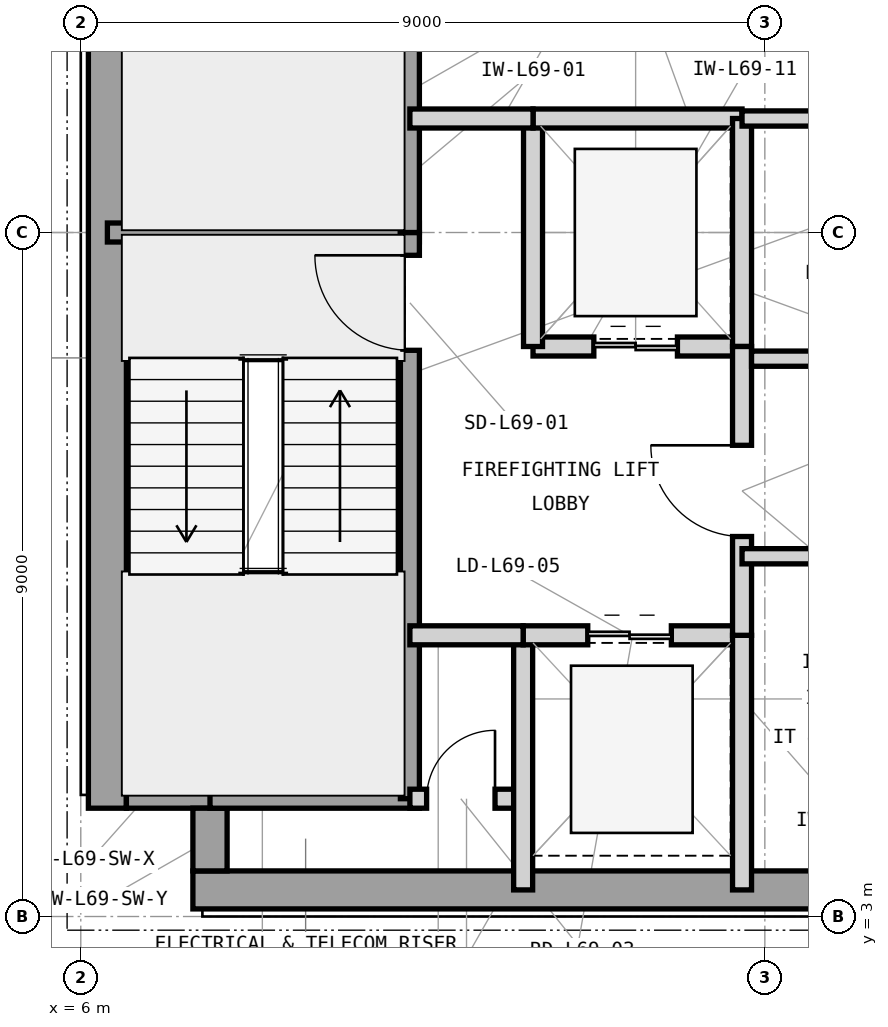
"""IFC4 building model, lengths in metres.
Left out: names, types, materials, properties, quantities, classifications, styles, units other than length and angle.
Written with IfcOpenShell. Run it as: python <this file> out.ifc"""

import sys

from ifc_helpers import new_model, si_unit, direction, frame, frame_2d, origin, place, context, subcontext, project, spatial, rectangle, extrude, element, fill, save


model = new_model("IFC4")
c1 = context("Model", 3, precision=1e-05, world=origin(), true_north=direction((0.0, 1.0)))
c2 = subcontext(c1, "Body", "Model", "MODEL_VIEW")
j1 = project(units=[si_unit("LENGTHUNIT", "METRE"), si_unit("PLANEANGLEUNIT", "RADIAN")], contexts=[c1])
p1 = place(None, origin())
s1 = spatial("IfcSite", under=j1, at=p1, CompositionType="ELEMENT")
p2 = place(p1, origin())
s2 = spatial("IfcBuilding", under=s1, at=p2, CompositionType="ELEMENT")
p3 = place(p2, frame((0.0, 0.0, 282.0)))
s3 = spatial("IfcBuildingStorey", under=s2, at=p3, CompositionType="ELEMENT", Elevation=282.0)
p4 = place(p3, frame((7.475, 3.35, 0.0), z_axis=(0.0, 0.0, 1.0), x_axis=(1.0, 0.0, 0.0)))
e1 = element("IfcWall", 1, at=p4, inside=s3, PredefinedType="SHEAR", context=c2, shape_type="SweptSolid", body=[
    extrude(rectangle(XDim=16.425, YDim=0.5, at=frame_2d((8.212, 0.0))), origin(), (0.0, 0.0, 1.0), 3.9),
])
p5 = place(p3, frame((6.35, 4.425, 0.0), z_axis=(0.0, 0.0, 1.0), x_axis=(0.0, 1.0, 0.0)))
e2 = element("IfcWall", 2, at=p5, inside=s3, PredefinedType="SHEAR", context=c2, shape_type="SweptSolid", body=[
    extrude(rectangle(XDim=15.15, YDim=0.5, at=frame_2d((7.575, 0.0))), origin(), (0.0, 0.0, 1.0), 3.9),
])
p6 = place(p3, frame((6.6, 4.65, 0.0), z_axis=(0.0, 0.0, 1.0), x_axis=(1.0, 0.0, 0.0)))
e3 = element("IfcWall", 3, at=p6, inside=s3, PredefinedType="SHEAR", context=c2, shape_type="SweptSolid", body=[
    extrude(rectangle(XDim=1.325, YDim=0.45, at=frame_2d((0.663, 0.0))), origin(), (0.0, 0.0, 1.0), 3.9),
])
p7 = place(p3, frame((7.7, 3.6, 0.0), z_axis=(0.0, 0.0, 1.0), x_axis=(0.0, 1.0, 0.0)))
e4 = element("IfcWall", 4, at=p7, inside=s3, PredefinedType="SHEAR", context=c2, shape_type="SweptSolid", body=[
    extrude(rectangle(XDim=0.825, YDim=0.45, at=frame_2d((0.413, 0.0))), origin(), (0.0, 0.0, 1.0), 3.9),
])
p8 = place(p3, frame((6.35, 12.0, 0.0), z_axis=(0.0, 0.0, 1.0), x_axis=(1.0, 0.0, 0.0)))
e5 = element("IfcWall", 5, at=p8, inside=s3, PredefinedType="SHEAR", context=c2, shape_type="SweptSolid", body=[
    extrude(rectangle(XDim=4.105, YDim=0.25, at=frame_2d((2.052, 0.0))), origin(), (0.0, 0.0, 1.0), 3.9),
])
p9 = place(p3, frame((7.7, 4.55, 0.0), z_axis=(0.0, 0.0, 1.0), x_axis=(1.0, 0.0, 0.0)))
e6 = element("IfcWall", 6, at=p9, inside=s3, PredefinedType="SHEAR", context=c2, shape_type="SweptSolid", body=[
    extrude(rectangle(XDim=2.755, YDim=0.25, at=frame_2d((1.377, 0.0))), origin(), (0.0, 0.0, 1.0), 3.9),
])
p10 = place(p3, frame((10.33, 4.55, 0.0), z_axis=(0.0, 0.0, 1.0), x_axis=(0.0, 1.0, 0.0)))
e7 = element("IfcWall", 7, at=p10, inside=s3, PredefinedType="SHEAR", context=c2, shape_type="SweptSolid", body=[
    extrude(rectangle(XDim=7.45, YDim=0.25, at=frame_2d((3.725, 0.0))), origin(), (0.0, 0.0, 1.0), 3.9),
])
p11 = place(p10, frame((5.9, 0.0, 0.0)))
e8 = element("IfcOpeningElement", 8, at=p11, cuts=e7, PredefinedType="OPENING", context=c2, shape_type="SweptSolid", body=[
    extrude(rectangle(XDim=1.25, YDim=2.2, at=frame_2d((0.625, 1.1))), frame((0.0, 0.135, 0.0), z_axis=(0.0, -1.0, 0.0), x_axis=(1.0, 0.0, 0.0)), (0.0, 0.0, 1.0), 0.27),
])
p12 = place(p3, frame((10.33, 12.0, 0.0), z_axis=(0.0, 0.0, 1.0), x_axis=(0.0, 1.0, 0.0)))
e9 = element("IfcWall", 9, at=p12, inside=s3, PredefinedType="SHEAR", context=c2, shape_type="SweptSolid", body=[
    extrude(rectangle(XDim=7.45, YDim=0.25, at=frame_2d((3.725, 0.0))), origin(), (0.0, 0.0, 1.0), 3.9),
])
p13 = place(p12, frame((5.85, 0.0, 0.0)))
e10 = element("IfcOpeningElement", 10, at=p13, cuts=e9, PredefinedType="OPENING", context=c2, shape_type="SweptSolid", body=[
    extrude(rectangle(XDim=1.25, YDim=2.2, at=frame_2d((0.625, 1.1))), frame((0.0, 0.135, 0.0), z_axis=(0.0, -1.0, 0.0), x_axis=(1.0, 0.0, 0.0)), (0.0, 0.0, 1.0), 0.27),
])
p14 = place(p3, frame((10.33, 4.55, 0.0), z_axis=(0.0, 0.0, 1.0), x_axis=(1.0, 0.0, 0.0)))
e11 = element("IfcWall", 11, at=p14, inside=s3, PredefinedType="PARTITIONING", context=c2, shape_type="SweptSolid", body=[
    extrude(rectangle(XDim=1.49, YDim=0.25, at=frame_2d((0.745, 0.0))), origin(), (0.0, 0.0, 1.0), 3.63),
])
p15 = place(p14, frame((0.22, 0.0, 0.0)))
e12 = element("IfcOpeningElement", 12, at=p15, cuts=e11, PredefinedType="OPENING", context=c2, shape_type="SweptSolid", body=[
    extrude(rectangle(XDim=0.9, YDim=2.1, at=frame_2d((0.45, 1.05))), frame((0.0, 0.135, 0.0), z_axis=(0.0, -1.0, 0.0), x_axis=(1.0, 0.0, 0.0)), (0.0, 0.0, 1.0), 0.27),
])
p16 = place(p3, frame((11.82, 3.35, 0.0), z_axis=(0.0, 0.0, 1.0), x_axis=(0.0, 1.0, 0.0)))
e13 = element("IfcWall", 13, at=p16, inside=s3, PredefinedType="PARTITIONING", context=c2, shape_type="SweptSolid", body=[
    extrude(rectangle(XDim=3.35, YDim=0.25, at=frame_2d((1.675, 0.0))), origin(), (0.0, 0.0, 1.0), 3.63),
])
p17 = place(p3, frame((11.82, 6.7, 0.0), z_axis=(0.0, 0.0, 1.0), x_axis=(1.0, 0.0, 0.0)))
e14 = element("IfcWall", 14, at=p17, inside=s3, PredefinedType="PARTITIONING", context=c2, shape_type="SweptSolid", body=[
    extrude(rectangle(XDim=2.88, YDim=0.25, at=frame_2d((1.44, 0.0))), origin(), (0.0, 0.0, 1.0), 3.354),
])
p18 = place(p17, frame((0.85, 0.0, 0.0)))
e15 = element("IfcOpeningElement", 15, at=p18, cuts=e14, PredefinedType="OPENING", context=c2, shape_type="SweptSolid", body=[
    extrude(rectangle(XDim=1.1, YDim=2.25, at=frame_2d((0.55, 1.125))), frame((0.0, 0.135, 0.0), z_axis=(0.0, -1.0, 0.0), x_axis=(1.0, 0.0, 0.0)), (0.0, 0.0, 1.0), 0.27),
])
p19 = place(p3, frame((14.7, 3.35, 0.0), z_axis=(0.0, 0.0, 1.0), x_axis=(0.0, 1.0, 0.0)))
e16 = element("IfcWall", 16, at=p19, inside=s3, PredefinedType="PARTITIONING", context=c2, shape_type="SweptSolid", body=[
    extrude(rectangle(XDim=3.35, YDim=0.25, at=frame_2d((1.675, 0.0))), origin(), (0.0, 0.0, 1.0), 3.63),
])
p20 = place(p3, frame((11.95, 10.5, 0.0), z_axis=(0.0, 0.0, 1.0), x_axis=(1.0, 0.0, 0.0)))
e17 = element("IfcWall", 17, at=p20, inside=s3, PredefinedType="PARTITIONING", context=c2, shape_type="SweptSolid", body=[
    extrude(rectangle(XDim=2.75, YDim=0.25, at=frame_2d((1.375, 0.0))), origin(), (0.0, 0.0, 1.0), 3.354),
])
p21 = place(p20, frame((0.8, 0.0, 0.0)))
e18 = element("IfcOpeningElement", 18, at=p21, cuts=e17, PredefinedType="OPENING", context=c2, shape_type="SweptSolid", body=[
    extrude(rectangle(XDim=1.1, YDim=2.25, at=frame_2d((0.55, 1.125))), frame((0.0, 0.135, 0.0), z_axis=(0.0, -1.0, 0.0), x_axis=(1.0, 0.0, 0.0)), (0.0, 0.0, 1.0), 0.27),
])
p22 = place(p3, frame((11.95, 10.5, 0.0), z_axis=(0.0, 0.0, 1.0), x_axis=(0.0, 1.0, 0.0)))
e19 = element("IfcWall", 19, at=p22, inside=s3, PredefinedType="PARTITIONING", context=c2, shape_type="SweptSolid", body=[
    extrude(rectangle(XDim=3.0, YDim=0.25, at=frame_2d((1.5, 0.0))), origin(), (0.0, 0.0, 1.0), 3.63),
])
p23 = place(p3, frame((11.95, 13.5, 0.0), z_axis=(0.0, 0.0, 1.0), x_axis=(1.0, 0.0, 0.0)))
e20 = element("IfcWall", 20, at=p23, inside=s3, PredefinedType="PARTITIONING", context=c2, shape_type="SweptSolid", body=[
    extrude(rectangle(XDim=2.75, YDim=0.25, at=frame_2d((1.375, 0.0))), origin(), (0.0, 0.0, 1.0), 3.354),
])
p24 = place(p3, frame((14.7, 10.5, 0.0), z_axis=(0.0, 0.0, 1.0), x_axis=(0.0, 1.0, 0.0)))
e21 = element("IfcWall", 21, at=p24, inside=s3, PredefinedType="PARTITIONING", context=c2, shape_type="SweptSolid", body=[
    extrude(rectangle(XDim=3.0, YDim=0.25, at=frame_2d((1.5, 0.0))), origin(), (0.0, 0.0, 1.0), 3.63),
])
p25 = place(p3, frame((14.7, 6.7, 0.0), z_axis=(0.0, 0.0, 1.0), x_axis=(0.0, 1.0, 0.0)))
e22 = element("IfcWall", 22, at=p25, inside=s3, PredefinedType="PARTITIONING", context=c2, shape_type="SweptSolid", body=[
    extrude(rectangle(XDim=3.8, YDim=0.25, at=frame_2d((1.9, 0.0))), origin(), (0.0, 0.0, 1.0), 3.63),
])
p26 = place(p25, frame((1.3, 0.0, 0.0)))
e23 = element("IfcOpeningElement", 23, at=p26, cuts=e22, PredefinedType="OPENING", context=c2, shape_type="SweptSolid", body=[
    extrude(rectangle(XDim=1.2, YDim=2.2, at=frame_2d((0.6, 1.1))), frame((0.0, 0.135, 0.0), z_axis=(0.0, -1.0, 0.0), x_axis=(1.0, 0.0, 0.0)), (0.0, 0.0, 1.0), 0.27),
])
p27 = place(p3, frame((10.33, 13.5, 0.0), z_axis=(0.0, 0.0, 1.0), x_axis=(1.0, 0.0, 0.0)))
e24 = element("IfcWall", 24, at=p27, inside=s3, PredefinedType="PARTITIONING", context=c2, shape_type="SweptSolid", body=[
    extrude(rectangle(XDim=1.62, YDim=0.25, at=frame_2d((0.81, 0.0))), origin(), (0.0, 0.0, 1.0), 3.354),
])
p28 = place(p3, frame((10.33, 6.7, 0.0), z_axis=(0.0, 0.0, 1.0), x_axis=(1.0, 0.0, 0.0)))
e25 = element("IfcWall", 25, at=p28, inside=s3, PredefinedType="PARTITIONING", context=c2, shape_type="SweptSolid", body=[
    extrude(rectangle(XDim=1.49, YDim=0.25, at=frame_2d((0.745, 0.0))), origin(), (0.0, 0.0, 1.0), 3.354),
])
p29 = place(p3, frame((14.7, 7.74, 0.0), z_axis=(0.0, 0.0, 1.0), x_axis=(1.0, 0.0, 0.0)))
e26 = element("IfcWall", 26, at=p29, inside=s3, PredefinedType="PARTITIONING", context=c2, shape_type="SweptSolid", body=[
    extrude(rectangle(XDim=2.95, YDim=0.2, at=frame_2d((1.475, 0.0))), origin(), (0.0, 0.0, 1.0), 3.63),
])
p30 = place(p29, frame((1.025, 0.0, 0.0)))
e27 = element("IfcOpeningElement", 27, at=p30, cuts=e26, PredefinedType="OPENING", context=c2, shape_type="SweptSolid", body=[
    extrude(rectangle(XDim=0.9, YDim=2.1, at=frame_2d((0.45, 1.05))), frame((0.0, 0.11, 0.0), z_axis=(0.0, -1.0, 0.0), x_axis=(1.0, 0.0, 0.0)), (0.0, 0.0, 1.0), 0.22),
])
p31 = place(p3, frame((14.825, 10.34, 0.0), z_axis=(0.0, 0.0, 1.0), x_axis=(1.0, 0.0, 0.0)))
e28 = element("IfcWall", 28, at=p31, inside=s3, PredefinedType="PARTITIONING", context=c2, shape_type="SweptSolid", body=[
    extrude(rectangle(XDim=4.88, YDim=0.2, at=frame_2d((2.44, 0.0))), origin(), (0.0, 0.0, 1.0), 3.63),
])
p32 = place(p3, frame((14.7, 13.5, 0.0), z_axis=(0.0, 0.0, 1.0), x_axis=(1.0, 0.0, 0.0)))
e29 = element("IfcWall", 29, at=p32, inside=s3, PredefinedType="PARTITIONING", context=c2, shape_type="SweptSolid", body=[
    extrude(rectangle(XDim=3.75, YDim=0.2, at=frame_2d((1.875, 0.0))), origin(), (0.0, 0.0, 1.0), 3.354),
])
p33 = place(p32, frame((1.4, 0.0, 0.0)))
e30 = element("IfcOpeningElement", 30, at=p33, cuts=e29, PredefinedType="OPENING", context=c2, shape_type="SweptSolid", body=[
    extrude(rectangle(XDim=0.95, YDim=2.1, at=frame_2d((0.475, 1.05))), frame((0.0, 0.11, 0.0), z_axis=(0.0, -1.0, 0.0), x_axis=(1.0, 0.0, 0.0)), (0.0, 0.0, 1.0), 0.22),
])
p34 = place(p11, origin())
e31 = element("IfcDoor", 31, at=p34, inside=s3, OperationType="SINGLE_SWING_RIGHT", PredefinedType="DOOR", context=c2, shape_type="SweptSolid", body=[
    extrude(rectangle(XDim=1.25, YDim=2.2, at=frame_2d((0.625, 1.1))), frame((0.0, 0.025, 0.0), z_axis=(0.0, -1.0, 0.0), x_axis=(1.0, 0.0, 0.0)), (0.0, 0.0, 1.0), 0.05),
])
fill(e8, e31)
p35 = place(p15, origin())
e32 = element("IfcDoor", 32, at=p35, inside=s3, OperationType="SINGLE_SWING_RIGHT", PredefinedType="TRAPDOOR", context=c2, shape_type="SweptSolid", body=[
    extrude(rectangle(XDim=0.9, YDim=2.1, at=frame_2d((0.45, 1.05))), frame((0.0, 0.025, 0.0), z_axis=(0.0, -1.0, 0.0), x_axis=(1.0, 0.0, 0.0)), (0.0, 0.0, 1.0), 0.05),
])
fill(e12, e32)
p36 = place(p18, origin())
e33 = element("IfcDoor", 33, at=p36, inside=s3, OperationType="DOUBLE_DOOR_SLIDING", PredefinedType="DOOR", context=c2, shape_type="SweptSolid", body=[
    extrude(rectangle(XDim=1.1, YDim=2.25, at=frame_2d((0.55, 1.125))), frame((0.0, 0.025, 0.0), z_axis=(0.0, -1.0, 0.0), x_axis=(1.0, 0.0, 0.0)), (0.0, 0.0, 1.0), 0.05),
])
fill(e15, e33)
p37 = place(p21, origin())
e34 = element("IfcDoor", 34, at=p37, inside=s3, OperationType="DOUBLE_DOOR_SLIDING", PredefinedType="DOOR", context=c2, shape_type="SweptSolid", body=[
    extrude(rectangle(XDim=1.1, YDim=2.25, at=frame_2d((0.55, 1.125))), frame((0.0, 0.025, 0.0), z_axis=(0.0, -1.0, 0.0), x_axis=(1.0, 0.0, 0.0)), (0.0, 0.0, 1.0), 0.05),
])
fill(e18, e34)
p38 = place(p26, origin())
e35 = element("IfcDoor", 35, at=p38, inside=s3, OperationType="SINGLE_SWING_RIGHT", PredefinedType="DOOR", context=c2, shape_type="SweptSolid", body=[
    extrude(rectangle(XDim=1.2, YDim=2.2, at=frame_2d((0.6, 1.1))), frame((0.0, 0.025, 0.0), z_axis=(0.0, -1.0, 0.0), x_axis=(1.0, 0.0, 0.0)), (0.0, 0.0, 1.0), 0.05),
])
fill(e23, e35)
save(model, sys.argv[1])
